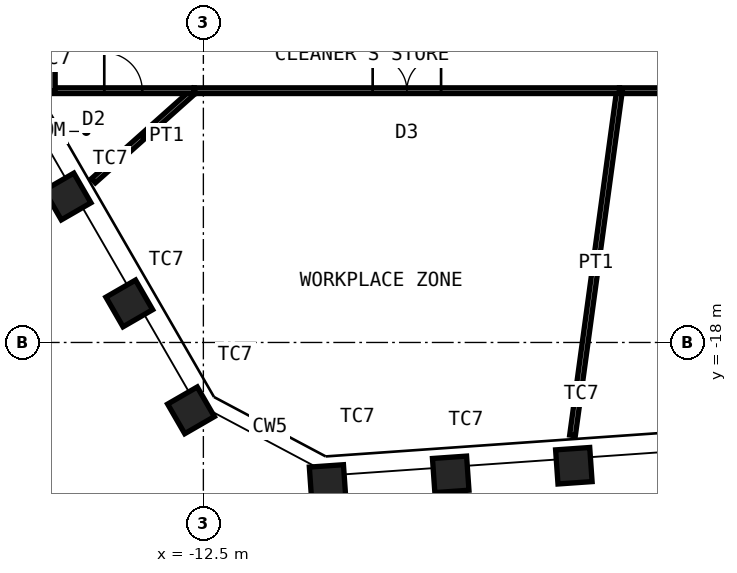
"""IFC4 building model, lengths in metres.
Left out: names, types, materials, properties, quantities, classifications, styles, units other than length and angle.
Written with IfcOpenShell. Run it as: python <this file> out.ifc"""

import sys

from ifc_helpers import new_model, si_unit, direction, frame, frame_2d, origin, origin_2d, place, context, subcontext, project, spatial, rectangle, hollow_rectangle, extrude, element, fill, save


model = new_model("IFC4")
c1 = context("Model", 3, precision=1e-05, world=origin(), true_north=direction((0.0, 1.0)))
c2 = subcontext(c1, "Body", "Model", "MODEL_VIEW")
j1 = project(units=[si_unit("LENGTHUNIT", "METRE"), si_unit("PLANEANGLEUNIT", "RADIAN")], contexts=[c1])
p1 = place(None, origin())
s1 = spatial("IfcSite", under=j1, at=p1, CompositionType="ELEMENT")
p2 = place(p1, origin())
s2 = spatial("IfcBuilding", under=s1, at=p2, CompositionType="ELEMENT")
p3 = place(p2, frame((0.0, 0.0, 287.2)))
s3 = spatial("IfcBuildingStorey", under=s2, at=p3, CompositionType="ELEMENT", Elevation=287.2)
for number, where, z_axis, x_axis in (
    (1, (-2.751, -21.244, 0.0), (0.0, 0.0, 1.0), (0.998, 0.07, 0.0)),
    (2, (-5.991, -21.47, 0.0), (0.0, 0.0, 1.0), (0.998, 0.07, 0.0)),
    (3, (-9.231, -21.697, 0.0), (0.0, 0.0, 1.0), (0.998, 0.07, 0.0)),
    (4, (-12.825, -19.786, 0.0), (0.0, 0.0, 1.0), (0.5, -0.866, 0.0)),
    (5, (-14.449, -16.973, 0.0), (0.0, 0.0, 1.0), (0.5, -0.866, 0.0)),
    (6, (-16.073, -14.16, 0.0), (0.0, 0.0, 1.0), (0.5, -0.866, 0.0)),
):
    element("IfcColumn", number, at=place(p3, frame(where, z_axis=z_axis, x_axis=x_axis)), inside=s3, PredefinedType="COLUMN", context=c2, shape_type="SweptSolid", body=[
        extrude(hollow_rectangle(XDim=0.9, YDim=0.9, WallThickness=0.06, at=origin_2d()), origin(), (0.0, 0.0, 1.0), 4.2),
    ])
p4 = place(p3, frame((3.963, -11.375, 0.0), z_axis=(0.0, 0.0, 1.0), x_axis=(-1.0, 0.0, 0.0)))
e7 = element("IfcWall", 7, at=p4, inside=s3, PredefinedType="PARTITIONING", context=c2, shape_type="SweptSolid", body=[
    extrude(rectangle(XDim=5.513, YDim=0.15, at=frame_2d((2.756, 0.0))), origin(), (0.0, 0.0, 1.0), 4.03),
])
p5 = place(p4, frame((1.856, 0.0, 0.0)))
e8 = element("IfcOpeningElement", 8, at=p5, cuts=e7, PredefinedType="OPENING", context=c2, shape_type="SweptSolid", body=[
    extrude(rectangle(XDim=1.8, YDim=2.4, at=frame_2d((0.9, 1.2))), frame((0.0, 0.085, 0.0), z_axis=(0.0, -1.0, 0.0), x_axis=(1.0, 0.0, 0.0)), (0.0, 0.0, 1.0), 0.17),
])
p6 = place(p3, frame((-2.786, -20.446, 0.0), z_axis=(0.0, 0.0, 1.0), x_axis=(0.135041803834, 0.99083990191, 0.0)))
e9 = element("IfcWall", 9, at=p6, inside=s3, PredefinedType="PARTITIONING", context=c2, shape_type="SweptSolid", body=[
    extrude(rectangle(XDim=9.155, YDim=0.15, at=frame_2d((4.578, 0.0))), origin(), (0.0, 0.0, 1.0), 3.33),
])
p7 = place(p3, frame((-1.55, -11.375, 0.0), z_axis=(0.0, 0.0, 1.0), x_axis=(-1.0, 0.0, 0.0)))
e10 = element("IfcWall", 10, at=p7, inside=s3, PredefinedType="PARTITIONING", context=c2, shape_type="SweptSolid", body=[
    extrude(rectangle(XDim=11.19, YDim=0.15, at=frame_2d((5.595, 0.0))), origin(), (0.0, 0.0, 1.0), 4.03),
])
p8 = place(p7, frame((4.695, 0.0, 0.0)))
e11 = element("IfcOpeningElement", 11, at=p8, cuts=e10, PredefinedType="OPENING", context=c2, shape_type="SweptSolid", body=[
    extrude(rectangle(XDim=1.8, YDim=2.4, at=frame_2d((0.9, 1.2))), frame((0.0, 0.085, 0.0), z_axis=(0.0, -1.0, 0.0), x_axis=(1.0, 0.0, 0.0)), (0.0, 0.0, 1.0), 0.17),
])
p9 = place(p3, frame((-15.393, -13.743, 0.0), z_axis=(0.0, 0.0, 1.0), x_axis=(0.745934007174, 0.666019862273, 0.0)))
e12 = element("IfcWall", 12, at=p9, inside=s3, PredefinedType="PARTITIONING", context=c2, shape_type="SweptSolid", body=[
    extrude(rectangle(XDim=3.556, YDim=0.15, at=frame_2d((1.778, 0.0))), origin(), (0.0, 0.0, 1.0), 3.33),
])
p10 = place(p3, frame((-12.74, -11.375, 0.0), z_axis=(0.0, 0.0, 1.0), x_axis=(-1.0, 0.0, 0.0)))
e13 = element("IfcWall", 13, at=p10, inside=s3, PredefinedType="PARTITIONING", context=c2, shape_type="SweptSolid", body=[
    extrude(rectangle(XDim=3.735, YDim=0.15, at=frame_2d((1.868, 0.0))), origin(), (0.0, 0.0, 1.0), 4.03),
])
p11 = place(p10, frame((1.367, 0.0, 0.0)))
e14 = element("IfcOpeningElement", 14, at=p11, cuts=e13, PredefinedType="OPENING", context=c2, shape_type="SweptSolid", body=[
    extrude(rectangle(XDim=1.0, YDim=2.4, at=frame_2d((0.5, 1.2))), frame((0.0, 0.085, 0.0), z_axis=(0.0, -1.0, 0.0), x_axis=(1.0, 0.0, 0.0)), (0.0, 0.0, 1.0), 0.17),
])
p12 = place(p3, frame((-16.475, -11.375, 0.0), z_axis=(0.0, 0.0, 1.0), x_axis=(0.0, 1.0, 0.0)))
e15 = element("IfcWall", 15, at=p12, inside=s3, PredefinedType="PARTITIONING", context=c2, shape_type="SweptSolid", body=[
    extrude(rectangle(XDim=0.774, YDim=0.15, at=frame_2d((0.387, 0.0))), origin(), (0.0, 0.0, 1.0), 4.03),
])
p13 = place(p3, frame((-17.007, -10.943, 0.0), z_axis=(0.0, 0.0, 1.0), x_axis=(0.840789611822, 0.541362012568, 0.0)))
e16 = element("IfcWall", 16, at=p13, inside=s3, PredefinedType="PARTITIONING", context=c2, shape_type="SweptSolid", body=[
    extrude(rectangle(XDim=0.633, YDim=0.15, at=frame_2d((0.316, 0.0))), origin(), (0.0, 0.0, 1.0), 3.33),
])
p14 = place(p3, frame((-16.475, -10.601, 0.0), z_axis=(0.0, 0.0, 1.0), x_axis=(0.0, 1.0, 0.0)))
e17 = element("IfcWall", 17, at=p14, inside=s3, PredefinedType="PARTITIONING", context=c2, shape_type="SweptSolid", body=[
    extrude(rectangle(XDim=3.396, YDim=0.15, at=frame_2d((1.698, 0.0))), origin(), (0.0, 0.0, 1.0), 4.03),
])
p15 = place(p14, frame((1.198, 0.0, 0.0)))
e18 = element("IfcOpeningElement", 18, at=p15, cuts=e17, PredefinedType="OPENING", context=c2, shape_type="SweptSolid", body=[
    extrude(rectangle(XDim=1.0, YDim=2.4, at=frame_2d((0.5, 1.2))), frame((0.0, 0.085, 0.0), z_axis=(0.0, -1.0, 0.0), x_axis=(1.0, 0.0, 0.0)), (0.0, 0.0, 1.0), 0.17),
])
p16 = place(p8, origin())
e19 = element("IfcDoor", 19, at=p16, inside=s3, OperationType="DOUBLE_DOOR_DOUBLE_SWING", PredefinedType="DOOR", context=c2, shape_type="SweptSolid", body=[
    extrude(rectangle(XDim=1.8, YDim=2.4, at=frame_2d((0.9, 1.2))), frame((0.0, 0.025, 0.0), z_axis=(0.0, -1.0, 0.0), x_axis=(1.0, 0.0, 0.0)), (0.0, 0.0, 1.0), 0.05),
])
fill(e11, e19)
p17 = place(p11, origin())
e20 = element("IfcDoor", 20, at=p17, inside=s3, OperationType="SINGLE_SWING_RIGHT", PredefinedType="DOOR", context=c2, shape_type="SweptSolid", body=[
    extrude(rectangle(XDim=1.0, YDim=2.4, at=frame_2d((0.5, 1.2))), frame((0.0, 0.025, 0.0), z_axis=(0.0, -1.0, 0.0), x_axis=(1.0, 0.0, 0.0)), (0.0, 0.0, 1.0), 0.05),
])
fill(e14, e20)
save(model, sys.argv[1])
